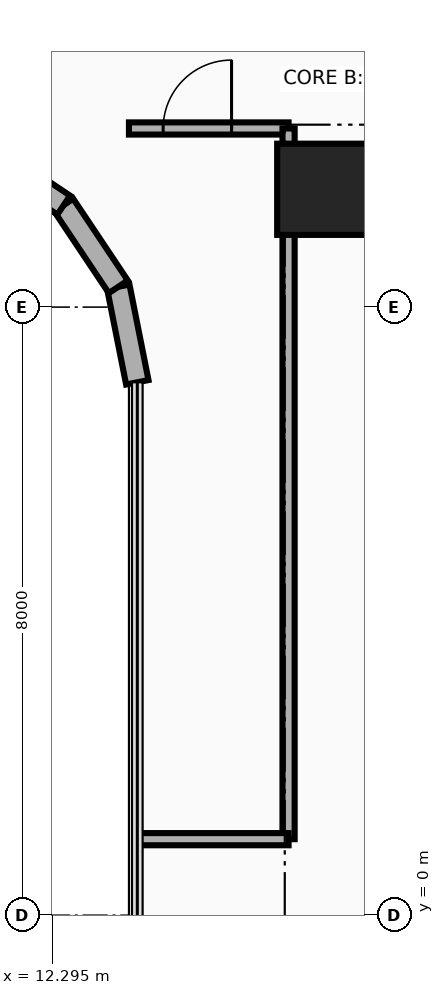
"""IFC4 building model, lengths in metres.
Left out: names, types, materials, properties, quantities, classifications, styles, units other than length and angle.
Written with IfcOpenShell. Run it as: python <this file> out.ifc"""

import sys

from ifc_helpers import new_model, si_unit, direction, frame, frame_2d, origin, origin_2d, place, context, subcontext, project, spatial, rectangle, extrude, source, transform, mapped, element, fill, save


model = new_model("IFC4")
c1 = context("Model", 3, precision=1e-05, world=origin(), true_north=direction((0.0, 1.0)))
c2 = subcontext(c1, "Body", "Model", "MODEL_VIEW")
j1 = project(units=[si_unit("LENGTHUNIT", "METRE"), si_unit("PLANEANGLEUNIT", "RADIAN")], contexts=[c1])
p1 = place(None, origin())
s1 = spatial("IfcSite", under=j1, at=p1, CompositionType="ELEMENT")
p2 = place(p1, origin())
s2 = spatial("IfcBuilding", under=s1, at=p2, CompositionType="ELEMENT")
p3 = place(p2, frame((0.0, 0.0, 116.8)))
s3 = spatial("IfcBuildingStorey", under=s2, at=p3, CompositionType="ELEMENT", Elevation=116.8)
p4 = place(p3, frame((15.85, 9.55, 0.0), z_axis=(0.0, 0.0, 1.0), x_axis=(1.0, 0.0, 0.0)))
e1 = element("IfcWall", 1, at=p4, inside=s3, PredefinedType="SHEAR", context=c2, shape_type="SweptSolid", body=[
    extrude(rectangle(XDim=9.0, YDim=0.7, at=frame_2d((4.5, 0.0))), origin(), (0.0, 0.0, 1.0), 3.46),
])
m1 = source(origin(), c2, "Body", "SweptSolid", [
    extrude(rectangle(XDim=1.2, YDim=1.2, at=origin_2d()), origin(), (0.0, 0.0, 1.0), 3.7),
])
p5 = place(p3, frame((15.85, 9.55, 0.0), z_axis=(0.0, 0.0, 1.0), x_axis=(1.0, 0.0, 0.0)))
e2 = element("IfcColumn", 2, at=p5, inside=s3, PredefinedType="COLUMN", context=c2, shape_type="MappedRepresentation", body=[
    mapped(m1, transform((0.0, 0.0, 0.0), x_axis=(1.0, 0.0, 0.0), y_axis=(0.0, 1.0, 0.0), z_axis=(0.0, 0.0, 1.0), scale=1.0)),
])
p6 = place(p3, frame((13.41, 7.011, 0.0), z_axis=(0.0, 0.0, 1.0), x_axis=(-0.195090163074, 0.980785312019, 0.0)))
e3 = element("IfcWall", 3, at=p6, inside=s3, PredefinedType="SOLIDWALL", context=c2, shape_type="SweptSolid", body=[
    extrude(rectangle(XDim=1.281, YDim=0.3, at=frame_2d((0.641, 0.0))), origin(), (0.0, 0.0, 1.0), 3.46),
])
for number, where, z_axis, x_axis in (
    (4, (13.16, 8.268, 0.0), (0.0, 0.0, 1.0), (-0.556, 0.831, 0.0)),
    (5, (12.442, 9.342, 0.0), (0.0, 0.0, 1.0), (-0.831, 0.556, 0.0)),
):
    element("IfcWall", number, at=place(p3, frame(where, z_axis=z_axis, x_axis=x_axis)), inside=s3, PredefinedType="SOLIDWALL", context=c2, shape_type="SweptSolid", body=[
        extrude(rectangle(XDim=1.292, YDim=0.3, at=frame_2d((0.646, 0.0))), origin(), (0.0, 0.0, 1.0), 3.46),
    ])
p7 = place(p3, frame((13.3, 10.35, 0.0), z_axis=(0.0, 0.0, 1.0), x_axis=(1.0, 0.0, 0.0)))
e6 = element("IfcWall", 6, at=p7, inside=s3, PredefinedType="PARTITIONING", context=c2, shape_type="SweptSolid", body=[
    extrude(rectangle(XDim=2.1, YDim=0.16, at=frame_2d((1.05, 0.0))), origin(), (0.0, 0.0, 1.0), 2.666),
])
p8 = place(p7, frame((0.45, 0.0, 0.0)))
e7 = element("IfcOpeningElement", 7, at=p8, cuts=e6, PredefinedType="OPENING", context=c2, shape_type="SweptSolid", body=[
    extrude(rectangle(XDim=0.9, YDim=2.1, at=frame_2d((0.45, 1.05))), frame((0.0, 0.095, 0.0), z_axis=(0.0, -1.0, 0.0), x_axis=(1.0, 0.0, 0.0)), (0.0, 0.0, 1.0), 0.19),
])
p9 = place(p3, frame((15.4, 1.0, 0.0), z_axis=(0.0, 0.0, 1.0), x_axis=(0.0, 1.0, 0.0)))
e8 = element("IfcWall", 8, at=p9, inside=s3, PredefinedType="PARTITIONING", context=c2, shape_type="SweptSolid", body=[
    extrude(rectangle(XDim=9.35, YDim=0.16, at=frame_2d((4.675, 0.0))), origin(), (0.0, 0.0, 1.0), 2.245),
])
p10 = place(p3, frame((13.41, 1.0, 0.0), z_axis=(0.0, 0.0, 1.0), x_axis=(1.0, 0.0, 0.0)))
e9 = element("IfcWall", 9, at=p10, inside=s3, PredefinedType="PARTITIONING", context=c2, shape_type="SweptSolid", body=[
    extrude(rectangle(XDim=1.99, YDim=0.16, at=frame_2d((0.995, 0.0))), origin(), (0.0, 0.0, 1.0), 2.245),
])
p11 = place(p8, origin())
e10 = element("IfcDoor", 10, at=p11, inside=s3, OperationType="SINGLE_SWING_LEFT", PredefinedType="DOOR", context=c2, shape_type="SweptSolid", body=[
    extrude(rectangle(XDim=0.9, YDim=2.1, at=frame_2d((0.45, 1.05))), frame((0.0, 0.025, 0.0), z_axis=(0.0, -1.0, 0.0), x_axis=(1.0, 0.0, 0.0)), (0.0, 0.0, 1.0), 0.05),
])
fill(e7, e10)
save(model, sys.argv[1])
